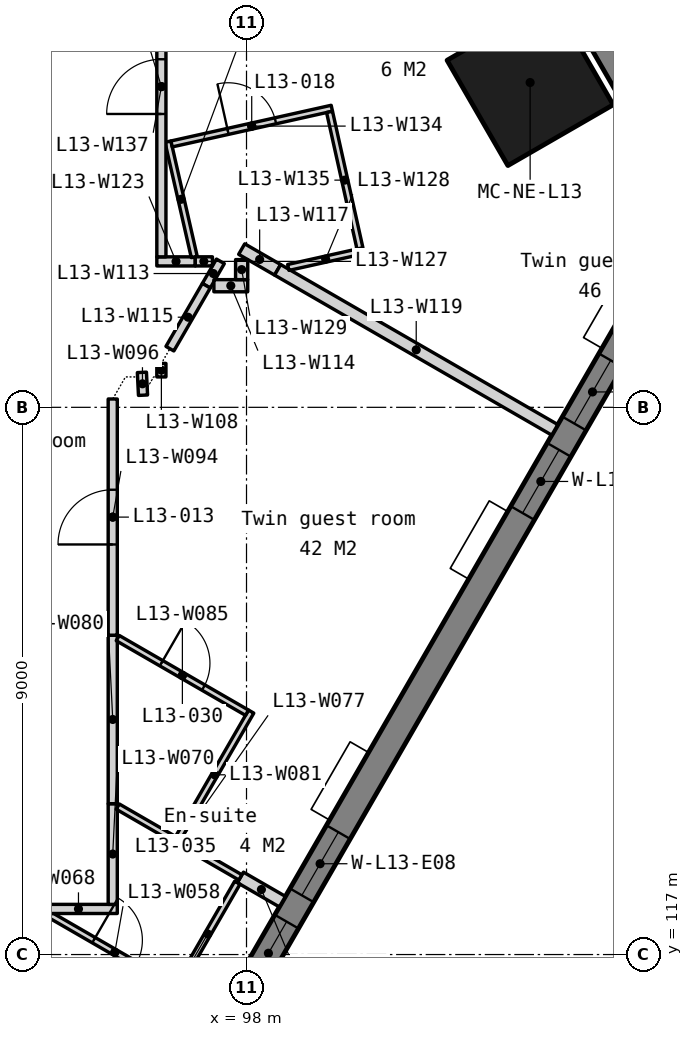
"""IFC4 building model, lengths in metres.
Left out: names, types, materials, properties, quantities, classifications, styles, units other than length and angle.
Written with IfcOpenShell. Run it as: python <this file> out.ifc"""

import sys

from ifc_helpers import new_model, si_unit, direction, frame, frame_2d, origin, origin_2d, place, context, subcontext, project, spatial, polyline, rectangle, outline, extrude, element, fill, save


model = new_model("IFC4")
c1 = context("Model", 3, precision=1e-05, world=origin(), true_north=direction((0.0, 1.0)))
c2 = subcontext(c1, "Body", "Model", "MODEL_VIEW")
j1 = project(units=[si_unit("LENGTHUNIT", "METRE"), si_unit("PLANEANGLEUNIT", "RADIAN")], contexts=[c1])
p1 = place(None, origin())
s1 = spatial("IfcSite", under=j1, at=p1, CompositionType="ELEMENT")
p2 = place(p1, origin())
s2 = spatial("IfcBuilding", under=s1, at=p2, CompositionType="ELEMENT")
p3 = place(p2, frame((0.0, 0.0, 59.5)))
s3 = spatial("IfcBuildingStorey", under=s2, at=p3, CompositionType="ELEMENT", Elevation=59.5)
p4 = place(p3, frame((102.664, 131.342, 0.0), z_axis=(0.0, 0.0, 1.0), x_axis=(-0.5, 0.866025403784, 0.0)))
e1 = element("IfcColumn", 1, at=p4, inside=s3, PredefinedType="COLUMN", context=c2, shape_type="SweptSolid", body=[
    extrude(rectangle(XDim=2.0, YDim=2.0, at=origin_2d()), origin(), (0.0, 0.0, 1.0), 3.5),
])
p5 = place(p3, frame((0.0, 0.0, -0.15)))
e2 = element("IfcWall", 2, at=p5, inside=s3, PredefinedType="SOLIDWALL", context=c2, shape_type="SweptSolid", body=[
    extrude(outline(polyline([(105.7, 129.284), (105.31, 129.509), (105.18, 129.284), (102.14, 134.55), (102.4, 134.55), (102.4, 135.0), (105.7, 129.284)])), origin(), (0.0, 0.0, 1.0), 3.5),
])
p6 = place(p3, frame((83.105, 90.599, -0.15), z_axis=(0.0, 0.0, 1.0), x_axis=(0.499999201451, 0.866025864826, 0.0)))
e3 = element("IfcWall", 3, at=p6, inside=s3, PredefinedType="SOLIDWALL", context=c2, shape_type="SweptSolid", body=[
    extrude(outline(polyline([(44.8, 0.0), (44.8, 3.5), (0.0, 3.5), (0.0, 0.0), (44.8, 0.0)])), frame((0.0, 0.225, 0.0), z_axis=(0.0, -1.0, 0.0), x_axis=(1.0, 0.0, 0.0)), (0.0, 0.0, 1.0), 0.45),
])
p7 = place(p6, frame((3.03, 0.0, 1.05)))
e4 = element("IfcOpeningElement", 4, at=p7, cuts=e3, PredefinedType="OPENING", context=c2, shape_type="SweptSolid", body=[
    extrude(rectangle(XDim=1.2, YDim=1.5, at=frame_2d((0.6, 0.75))), frame((0.0, 0.235, 0.0), z_axis=(0.0, -1.0, 0.0), x_axis=(1.0, 0.0, 0.0)), (0.0, 0.0, 1.0), 0.47),
])
p8 = place(p6, frame((4.73, 0.0, 1.05)))
e5 = element("IfcOpeningElement", 5, at=p8, cuts=e3, PredefinedType="OPENING", context=c2, shape_type="SweptSolid", body=[
    extrude(rectangle(XDim=1.2, YDim=1.5, at=frame_2d((0.6, 0.75))), frame((0.0, 0.235, 0.0), z_axis=(0.0, -1.0, 0.0), x_axis=(1.0, 0.0, 0.0)), (0.0, 0.0, 1.0), 0.47),
])
p9 = place(p6, frame((11.99, 0.0, 1.05)))
e6 = element("IfcOpeningElement", 6, at=p9, cuts=e3, PredefinedType="OPENING", context=c2, shape_type="SweptSolid", body=[
    extrude(rectangle(XDim=1.2, YDim=1.5, at=frame_2d((0.6, 0.75))), frame((0.0, 0.235, 0.0), z_axis=(0.0, -1.0, 0.0), x_axis=(1.0, 0.0, 0.0)), (0.0, 0.0, 1.0), 0.47),
])
p10 = place(p6, frame((13.69, 0.0, 1.05)))
e7 = element("IfcOpeningElement", 7, at=p10, cuts=e3, PredefinedType="OPENING", context=c2, shape_type="SweptSolid", body=[
    extrude(rectangle(XDim=1.2, YDim=1.5, at=frame_2d((0.6, 0.75))), frame((0.0, 0.235, 0.0), z_axis=(0.0, -1.0, 0.0), x_axis=(1.0, 0.0, 0.0)), (0.0, 0.0, 1.0), 0.47),
])
p11 = place(p6, frame((20.95, 0.0, 1.05)))
e8 = element("IfcOpeningElement", 8, at=p11, cuts=e3, PredefinedType="OPENING", context=c2, shape_type="SweptSolid", body=[
    extrude(rectangle(XDim=1.2, YDim=1.5, at=frame_2d((0.6, 0.75))), frame((0.0, 0.235, 0.0), z_axis=(0.0, -1.0, 0.0), x_axis=(1.0, 0.0, 0.0)), (0.0, 0.0, 1.0), 0.47),
])
p12 = place(p6, frame((22.65, 0.0, 1.05)))
e9 = element("IfcOpeningElement", 9, at=p12, cuts=e3, PredefinedType="OPENING", context=c2, shape_type="SweptSolid", body=[
    extrude(rectangle(XDim=1.2, YDim=1.5, at=frame_2d((0.6, 0.75))), frame((0.0, 0.235, 0.0), z_axis=(0.0, -1.0, 0.0), x_axis=(1.0, 0.0, 0.0)), (0.0, 0.0, 1.0), 0.47),
])
p13 = place(p6, frame((29.91, 0.0, 1.05)))
e10 = element("IfcOpeningElement", 10, at=p13, cuts=e3, PredefinedType="OPENING", context=c2, shape_type="SweptSolid", body=[
    extrude(rectangle(XDim=1.2, YDim=1.5, at=frame_2d((0.6, 0.75))), frame((0.0, 0.235, 0.0), z_axis=(0.0, -1.0, 0.0), x_axis=(1.0, 0.0, 0.0)), (0.0, 0.0, 1.0), 0.47),
])
p14 = place(p6, frame((31.61, 0.0, 1.05)))
e11 = element("IfcOpeningElement", 11, at=p14, cuts=e3, PredefinedType="OPENING", context=c2, shape_type="SweptSolid", body=[
    extrude(rectangle(XDim=1.2, YDim=1.5, at=frame_2d((0.6, 0.75))), frame((0.0, 0.235, 0.0), z_axis=(0.0, -1.0, 0.0), x_axis=(1.0, 0.0, 0.0)), (0.0, 0.0, 1.0), 0.47),
])
p15 = place(p6, frame((38.87, 0.0, 1.05)))
e12 = element("IfcOpeningElement", 12, at=p15, cuts=e3, PredefinedType="OPENING", context=c2, shape_type="SweptSolid", body=[
    extrude(rectangle(XDim=1.2, YDim=1.5, at=frame_2d((0.6, 0.75))), frame((0.0, 0.235, 0.0), z_axis=(0.0, -1.0, 0.0), x_axis=(1.0, 0.0, 0.0)), (0.0, 0.0, 1.0), 0.47),
])
p16 = place(p6, frame((40.57, 0.0, 1.05)))
e13 = element("IfcOpeningElement", 13, at=p16, cuts=e3, PredefinedType="OPENING", context=c2, shape_type="SweptSolid", body=[
    extrude(rectangle(XDim=1.2, YDim=1.5, at=frame_2d((0.6, 0.75))), frame((0.0, 0.235, 0.0), z_axis=(0.0, -1.0, 0.0), x_axis=(1.0, 0.0, 0.0)), (0.0, 0.0, 1.0), 0.47),
])
p17 = place(p3, frame((0.0, 0.0, -0.15)))
e14 = element("IfcWall", 14, at=p17, inside=s3, PredefinedType="SOLIDWALL", context=c2, shape_type="SweptSolid", body=[
    extrude(outline(polyline([(105.7, 129.284), (106.626, 134.132), (102.4, 135.0), (105.7, 129.284)])), origin(), (0.0, 0.0, 1.0), 3.5),
])
p18 = place(p3, frame((90.751, 117.223, 0.0), z_axis=(0.0, 0.0, 1.0), x_axis=(0.866015162859, -0.500017737384, 0.0)))
e15 = element("IfcWall", 15, at=p18, inside=s3, PredefinedType="PARTITIONING", context=c2, shape_type="SweptSolid", body=[
    extrude(rectangle(XDim=6.465, YDim=0.2, at=frame_2d((3.232, 0.0))), origin(), (0.0, 0.0, 1.0), 3.35),
])
p19 = place(p3, frame((94.775, 117.647, 0.0), z_axis=(0.0, 0.0, 1.0), x_axis=(0.86604092097, -0.499973122483, 0.0)))
e16 = element("IfcWall", 16, at=p19, inside=s3, PredefinedType="PARTITIONING", context=c2, shape_type="SweptSolid", body=[
    extrude(rectangle(XDim=2.445, YDim=0.1, at=frame_2d((1.223, 0.0))), origin(), (0.0, 0.0, 1.0), 3.35),
])
p20 = place(p19, frame((0.823, 0.0, 0.0)))
e17 = element("IfcOpeningElement", 17, at=p20, cuts=e16, PredefinedType="OPENING", context=c2, shape_type="SweptSolid", body=[
    extrude(rectangle(XDim=0.8, YDim=2.1, at=frame_2d((0.4, 1.05))), frame((0.0, 0.06, 0.0), z_axis=(0.0, -1.0, 0.0), x_axis=(1.0, 0.0, 0.0)), (0.0, 0.0, 1.0), 0.12),
])
p21 = place(p3, frame((94.598, 117.75, 0.0), z_axis=(0.0, 0.0, 1.0), x_axis=(1.0, 0.0, 0.0)))
e18 = element("IfcWall", 18, at=p21, inside=s3, PredefinedType="PARTITIONING", context=c2, shape_type="SweptSolid", body=[
    extrude(rectangle(XDim=1.277, YDim=0.15, at=frame_2d((0.639, 0.0))), origin(), (0.0, 0.0, 1.0), 3.35),
])
p22 = place(p3, frame((95.8, 117.825, 0.0), z_axis=(0.0, 0.0, 1.0), x_axis=(0.0, 1.0, 0.0)))
e19 = element("IfcWall", 19, at=p22, inside=s3, PredefinedType="PARTITIONING", context=c2, shape_type="SweptSolid", body=[
    extrude(rectangle(XDim=1.656, YDim=0.15, at=frame_2d((0.828, 0.0))), origin(), (0.0, 0.0, 1.0), 3.35),
])
p23 = place(p3, frame((97.9, 118.269, 0.0), z_axis=(0.0, 0.0, 1.0), x_axis=(0.866068339032, -0.499925626596, 0.0)))
e20 = element("IfcWall", 20, at=p23, inside=s3, PredefinedType="PARTITIONING", context=c2, shape_type="SweptSolid", body=[
    extrude(rectangle(XDim=0.797, YDim=0.2, at=frame_2d((0.399, 0.0))), origin(), (0.0, 0.0, 1.0), 3.35),
])
p24 = place(p3, frame((96.875, 116.493, 0.0), z_axis=(0.0, 0.0, 1.0), x_axis=(0.500043961785, 0.866000020948, 0.0)))
e21 = element("IfcWall", 21, at=p24, inside=s3, PredefinedType="PARTITIONING", context=c2, shape_type="SweptSolid", body=[
    extrude(rectangle(XDim=1.95, YDim=0.1, at=frame_2d((0.975, 0.0))), origin(), (0.0, 0.0, 1.0), 3.35),
])
p25 = place(p3, frame((95.882, 119.433, 0.0), z_axis=(0.0, 0.0, 1.0), x_axis=(0.866009305107, -0.50002788269, 0.0)))
e22 = element("IfcWall", 22, at=p25, inside=s3, PredefinedType="PARTITIONING", context=c2, shape_type="SweptSolid", body=[
    extrude(rectangle(XDim=2.329, YDim=0.1, at=frame_2d((1.165, 0.0))), origin(), (0.0, 0.0, 1.0), 3.35),
])
p26 = place(p3, frame((95.8, 119.481, 0.0), z_axis=(0.0, 0.0, 1.0), x_axis=(0.0, 1.0, 0.0)))
e23 = element("IfcWall", 23, at=p26, inside=s3, PredefinedType="PARTITIONING", context=c2, shape_type="SweptSolid", body=[
    extrude(rectangle(XDim=2.771, YDim=0.15, at=frame_2d((1.386, 0.0))), origin(), (0.0, 0.0, 1.0), 3.35),
])
p27 = place(p3, frame((96.877, 118.917, 0.0), z_axis=(0.0, 0.0, 1.0), x_axis=(0.500001309137, 0.866024647952, 0.0)))
e24 = element("IfcWall", 24, at=p27, inside=s3, PredefinedType="PARTITIONING", context=c2, shape_type="SweptSolid", body=[
    extrude(rectangle(XDim=2.4, YDim=0.1, at=frame_2d((1.2, 0.0))), origin(), (0.0, 0.0, 1.0), 3.35),
])
p28 = place(p3, frame((95.882, 122.205, 0.0), z_axis=(0.0, 0.0, 1.0), x_axis=(0.866006720078, -0.500032359733, 0.0)))
e25 = element("IfcWall", 25, at=p28, inside=s3, PredefinedType="PARTITIONING", context=c2, shape_type="SweptSolid", body=[
    extrude(rectangle(XDim=2.455, YDim=0.1, at=frame_2d((1.228, 0.0))), origin(), (0.0, 0.0, 1.0), 3.35),
])
p29 = place(p28, frame((0.827, 0.0, 0.0)))
e26 = element("IfcOpeningElement", 26, at=p29, cuts=e25, PredefinedType="OPENING", context=c2, shape_type="SweptSolid", body=[
    extrude(rectangle(XDim=0.8, YDim=2.1, at=frame_2d((0.4, 1.05))), frame((0.0, 0.06, 0.0), z_axis=(0.0, -1.0, 0.0), x_axis=(1.0, 0.0, 0.0)), (0.0, 0.0, 1.0), 0.12),
])
p30 = place(p3, frame((95.8, 122.252, 0.0), z_axis=(0.0, 0.0, 1.0), x_axis=(0.0, 1.0, 0.0)))
e27 = element("IfcWall", 27, at=p30, inside=s3, PredefinedType="PARTITIONING", context=c2, shape_type="SweptSolid", body=[
    extrude(rectangle(XDim=3.885, YDim=0.15, at=frame_2d((1.942, 0.0))), origin(), (0.0, 0.0, 1.0), 3.35),
])
p31 = place(p30, frame((1.492, 0.0, 0.0)))
e28 = element("IfcOpeningElement", 28, at=p31, cuts=e27, PredefinedType="OPENING", context=c2, shape_type="SweptSolid", body=[
    extrude(rectangle(XDim=0.9, YDim=2.1, at=frame_2d((0.45, 1.05))), frame((0.0, 0.085, 0.0), z_axis=(0.0, -1.0, 0.0), x_axis=(1.0, 0.0, 0.0)), (0.0, 0.0, 1.0), 0.17),
])
p32 = place(p3, frame((96.28, 126.575, 0.0), z_axis=(0.0, 0.0, 1.0), x_axis=(0.049354603538, -0.998781318963, 0.0)))
e29 = element("IfcWall", 29, at=p32, inside=s3, PredefinedType="PARTITIONING", context=c2, shape_type="SweptSolid", body=[
    extrude(rectangle(XDim=0.376, YDim=0.15, at=frame_2d((0.188, 0.0))), origin(), (0.0, 0.0, 1.0), 3.35),
])
p33 = place(p3, frame((96.6, 126.5, 0.0), z_axis=(0.0, 0.0, 1.0), x_axis=(0.0, 1.0, 0.0)))
e30 = element("IfcWall", 30, at=p33, inside=s3, PredefinedType="PARTITIONING", context=c2, shape_type="SweptSolid", body=[
    extrude(rectangle(XDim=0.223, YDim=0.15, at=frame_2d((0.111, 0.0))), origin(), (0.0, 0.0, 1.0), 3.35),
])
p34 = place(p3, frame((97.339, 128.0, 0.0), z_axis=(0.0, 0.0, 1.0), x_axis=(0.500391795928, 0.865799082101, 0.0)))
e31 = element("IfcWall", 31, at=p34, inside=s3, PredefinedType="PARTITIONING", context=c2, shape_type="SweptSolid", body=[
    extrude(rectangle(XDim=0.463, YDim=0.15, at=frame_2d((0.231, 0.0))), origin(), (0.0, 0.0, 1.0), 3.35),
])
p35 = place(p3, frame((97.464, 128.0, 0.0), z_axis=(0.0, 0.0, 1.0), x_axis=(1.0, 0.0, 0.0)))
e32 = element("IfcWall", 32, at=p35, inside=s3, PredefinedType="PARTITIONING", context=c2, shape_type="SweptSolid", body=[
    extrude(rectangle(XDim=0.556, YDim=0.2, at=frame_2d((0.278, 0.0))), origin(), (0.0, 0.0, 1.0), 2.938),
])
p36 = place(p3, frame((96.74, 126.965, 0.0), z_axis=(0.0, 0.0, 1.0), x_axis=(0.500529245116, 0.865719628277, 0.0)))
e33 = element("IfcWall", 33, at=p36, inside=s3, PredefinedType="PARTITIONING", context=c2, shape_type="SweptSolid", body=[
    extrude(rectangle(XDim=1.196, YDim=0.15, at=frame_2d((0.598, 0.0))), origin(), (0.0, 0.0, 1.0), 3.35),
])
p37 = place(p3, frame((97.921, 128.603, 0.0), z_axis=(0.0, 0.0, 1.0), x_axis=(0.865989003036, -0.500063042646, 0.0)))
e34 = element("IfcWall", 34, at=p37, inside=s3, PredefinedType="PARTITIONING", context=c2, shape_type="SweptSolid", body=[
    extrude(rectangle(XDim=0.683, YDim=0.2, at=frame_2d((0.341, 0.0))), origin(), (0.0, 0.0, 1.0), 3.35),
])
p38 = place(p3, frame((98.512, 128.261, 0.0), z_axis=(0.0, 0.0, 1.0), x_axis=(0.866031112038, -0.499990112884, 0.0)))
e35 = element("IfcWall", 35, at=p38, inside=s3, PredefinedType="PARTITIONING", context=c2, shape_type="SweptSolid", body=[
    extrude(rectangle(XDim=5.264, YDim=0.2, at=frame_2d((2.632, 0.0))), origin(), (0.0, 0.0, 1.0), 3.35),
])
p39 = place(p3, frame((96.525, 128.4, 0.0), z_axis=(0.0, 0.0, 1.0), x_axis=(1.0, 0.0, 0.0)))
e36 = element("IfcWall", 36, at=p39, inside=s3, PredefinedType="PARTITIONING", context=c2, shape_type="SweptSolid", body=[
    extrude(rectangle(XDim=0.633, YDim=0.15, at=frame_2d((0.316, 0.0))), origin(), (0.0, 0.0, 1.0), 3.35),
])
p40 = place(p3, frame((96.708, 130.37, 0.0), z_axis=(0.0, 0.0, 1.0), x_axis=(0.222402197424, -0.974955005413, 0.0)))
e37 = element("IfcWall", 37, at=p40, inside=s3, PredefinedType="PARTITIONING", context=c2, shape_type="SweptSolid", body=[
    extrude(rectangle(XDim=1.945, YDim=0.1, at=frame_2d((0.973, 0.0))), origin(), (0.0, 0.0, 1.0), 3.35),
])
p41 = place(p3, frame((97.157, 128.4, 0.0), z_axis=(0.0, 0.0, 1.0), x_axis=(0.999996638419, 0.002592903989, 0.0)))
e38 = element("IfcWall", 38, at=p41, inside=s3, PredefinedType="PARTITIONING", context=c2, shape_type="SweptSolid", body=[
    extrude(rectangle(XDim=0.282, YDim=0.15, at=frame_2d((0.141, 0.0))), origin(), (0.0, 0.0, 1.0), 3.35),
])
p42 = place(p3, frame((98.687, 128.301, 0.0), z_axis=(0.0, 0.0, 1.0), x_axis=(0.976063649291, 0.217485062782, 0.0)))
e39 = element("IfcWall", 39, at=p42, inside=s3, PredefinedType="PARTITIONING", context=c2, shape_type="SweptSolid", body=[
    extrude(rectangle(XDim=1.258, YDim=0.1, at=frame_2d((0.629, 0.0))), origin(), (0.0, 0.0, 1.0), 3.35),
])
p43 = place(p3, frame((97.92, 128.1, 0.0), z_axis=(0.0, 0.0, 1.0), x_axis=(0.000740740538, 0.999999725652, 0.0)))
e40 = element("IfcWall", 40, at=p43, inside=s3, PredefinedType="PARTITIONING", context=c2, shape_type="SweptSolid", body=[
    extrude(rectangle(XDim=0.33, YDim=0.2, at=frame_2d((0.165, 0.0))), origin(), (0.0, 0.0, 1.0), 3.35),
])
p44 = place(p3, frame((96.768, 130.332, 0.0), z_axis=(0.0, 0.0, 1.0), x_axis=(0.976069905732, 0.21745698224, 0.0)))
e41 = element("IfcWall", 41, at=p44, inside=s3, PredefinedType="PARTITIONING", context=c2, shape_type="SweptSolid", body=[
    extrude(rectangle(XDim=2.7, YDim=0.1, at=frame_2d((1.35, 0.0))), origin(), (0.0, 0.0, 1.0), 3.35),
])
p45 = place(p44, frame((0.95, 0.0, 0.0)))
e42 = element("IfcOpeningElement", 42, at=p45, cuts=e41, PredefinedType="OPENING", context=c2, shape_type="SweptSolid", body=[
    extrude(rectangle(XDim=0.8, YDim=2.1, at=frame_2d((0.4, 1.05))), frame((0.0, 0.06, 0.0), z_axis=(0.0, -1.0, 0.0), x_axis=(1.0, 0.0, 0.0)), (0.0, 0.0, 1.0), 0.12),
])
p46 = place(p3, frame((99.365, 130.859, 0.0), z_axis=(0.0, 0.0, 1.0), x_axis=(0.217402503607, -0.97608204134, 0.0)))
e43 = element("IfcWall", 43, at=p46, inside=s3, PredefinedType="PARTITIONING", context=c2, shape_type="SweptSolid", body=[
    extrude(rectangle(XDim=2.3, YDim=0.1, at=frame_2d((1.15, 0.0))), origin(), (0.0, 0.0, 1.0), 3.35),
])
p47 = place(p3, frame((96.6, 128.475, 0.0), z_axis=(0.0, 0.0, 1.0), x_axis=(0.0, 1.0, 0.0)))
e44 = element("IfcWall", 44, at=p47, inside=s3, PredefinedType="PARTITIONING", context=c2, shape_type="SweptSolid", body=[
    extrude(rectangle(XDim=5.599, YDim=0.15, at=frame_2d((2.8, 0.0))), origin(), (0.0, 0.0, 1.0), 3.35),
])
p48 = place(p47, frame((2.35, 0.0, 0.0)))
e45 = element("IfcOpeningElement", 45, at=p48, cuts=e44, PredefinedType="OPENING", context=c2, shape_type="SweptSolid", body=[
    extrude(rectangle(XDim=0.9, YDim=2.1, at=frame_2d((0.45, 1.05))), frame((0.0, 0.085, 0.0), z_axis=(0.0, -1.0, 0.0), x_axis=(1.0, 0.0, 0.0)), (0.0, 0.0, 1.0), 0.17),
])
p49 = place(p13, origin())
e46 = element("IfcWindow", 46, at=p49, inside=s3, PartitioningType="SINGLE_PANEL", PredefinedType="WINDOW", context=c2, shape_type="SweptSolid", body=[
    extrude(rectangle(XDim=1.2, YDim=1.5, at=frame_2d((0.6, 0.75))), frame((0.0, 0.03, 0.0), z_axis=(0.0, -1.0, 0.0), x_axis=(1.0, 0.0, 0.0)), (0.0, 0.0, 1.0), 0.06),
])
fill(e10, e46)
p50 = place(p14, origin())
e47 = element("IfcWindow", 47, at=p50, inside=s3, PartitioningType="SINGLE_PANEL", PredefinedType="WINDOW", context=c2, shape_type="SweptSolid", body=[
    extrude(rectangle(XDim=1.2, YDim=1.5, at=frame_2d((0.6, 0.75))), frame((0.0, 0.03, 0.0), z_axis=(0.0, -1.0, 0.0), x_axis=(1.0, 0.0, 0.0)), (0.0, 0.0, 1.0), 0.06),
])
fill(e11, e47)
p51 = place(p15, origin())
e48 = element("IfcWindow", 48, at=p51, inside=s3, PartitioningType="SINGLE_PANEL", PredefinedType="WINDOW", context=c2, shape_type="SweptSolid", body=[
    extrude(rectangle(XDim=1.2, YDim=1.5, at=frame_2d((0.6, 0.75))), frame((0.0, 0.03, 0.0), z_axis=(0.0, -1.0, 0.0), x_axis=(1.0, 0.0, 0.0)), (0.0, 0.0, 1.0), 0.06),
])
fill(e12, e48)
p52 = place(p16, origin())
e49 = element("IfcWindow", 49, at=p52, inside=s3, PartitioningType="SINGLE_PANEL", PredefinedType="WINDOW", context=c2, shape_type="SweptSolid", body=[
    extrude(rectangle(XDim=1.2, YDim=1.5, at=frame_2d((0.6, 0.75))), frame((0.0, 0.03, 0.0), z_axis=(0.0, -1.0, 0.0), x_axis=(1.0, 0.0, 0.0)), (0.0, 0.0, 1.0), 0.06),
])
fill(e13, e49)
p53 = place(p48, origin())
e50 = element("IfcDoor", 50, at=p53, inside=s3, OperationType="SINGLE_SWING_LEFT", PredefinedType="DOOR", context=c2, shape_type="SweptSolid", body=[
    extrude(rectangle(XDim=0.9, YDim=2.1, at=frame_2d((0.45, 1.05))), frame((0.0, 0.025, 0.0), z_axis=(0.0, -1.0, 0.0), x_axis=(1.0, 0.0, 0.0)), (0.0, 0.0, 1.0), 0.05),
])
fill(e45, e50)
p54 = place(p31, origin())
e51 = element("IfcDoor", 51, at=p54, inside=s3, OperationType="SINGLE_SWING_LEFT", PredefinedType="DOOR", context=c2, shape_type="SweptSolid", body=[
    extrude(rectangle(XDim=0.9, YDim=2.1, at=frame_2d((0.45, 1.05))), frame((0.0, 0.025, 0.0), z_axis=(0.0, -1.0, 0.0), x_axis=(1.0, 0.0, 0.0)), (0.0, 0.0, 1.0), 0.05),
])
fill(e28, e51)
p55 = place(p45, origin())
e52 = element("IfcDoor", 52, at=p55, inside=s3, OperationType="SINGLE_SWING_LEFT", PredefinedType="DOOR", context=c2, shape_type="SweptSolid", body=[
    extrude(rectangle(XDim=0.8, YDim=2.1, at=frame_2d((0.4, 1.05))), frame((0.0, 0.025, 0.0), z_axis=(0.0, -1.0, 0.0), x_axis=(1.0, 0.0, 0.0)), (0.0, 0.0, 1.0), 0.05),
])
fill(e42, e52)
p56 = place(p20, origin())
e53 = element("IfcDoor", 53, at=p56, inside=s3, OperationType="SINGLE_SWING_LEFT", PredefinedType="DOOR", context=c2, shape_type="SweptSolid", body=[
    extrude(rectangle(XDim=0.8, YDim=2.1, at=frame_2d((0.4, 1.05))), frame((0.0, 0.025, 0.0), z_axis=(0.0, -1.0, 0.0), x_axis=(1.0, 0.0, 0.0)), (0.0, 0.0, 1.0), 0.05),
])
fill(e17, e53)
p57 = place(p29, origin())
e54 = element("IfcDoor", 54, at=p57, inside=s3, OperationType="SINGLE_SWING_LEFT", PredefinedType="DOOR", context=c2, shape_type="SweptSolid", body=[
    extrude(rectangle(XDim=0.8, YDim=2.1, at=frame_2d((0.4, 1.05))), frame((0.0, 0.025, 0.0), z_axis=(0.0, -1.0, 0.0), x_axis=(1.0, 0.0, 0.0)), (0.0, 0.0, 1.0), 0.05),
])
fill(e26, e54)
save(model, sys.argv[1])
